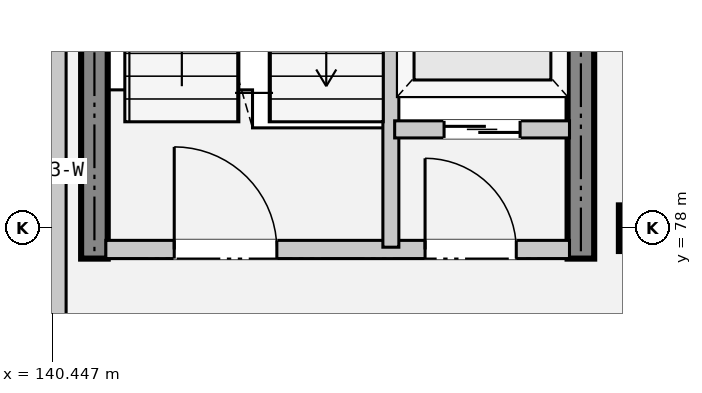
"""IFC4 building model, lengths in metres.
Left out: names, types, materials, properties, quantities, classifications, styles, units other than length and angle.
Written with IfcOpenShell. Run it as: python <this file> out.ifc"""

import sys

from ifc_helpers import new_model, si_unit, direction, frame, frame_2d, origin, origin_2d, place, context, subcontext, project, spatial, rectangle, extrude, element, fill, save


model = new_model("IFC4")
c1 = context("Model", 3, precision=1e-05, world=origin(), true_north=direction((0.0, 1.0)))
c2 = subcontext(c1, "Body", "Model", "MODEL_VIEW")
j1 = project(units=[si_unit("LENGTHUNIT", "METRE"), si_unit("PLANEANGLEUNIT", "RADIAN")], contexts=[c1])
p1 = place(None, origin())
s1 = spatial("IfcSite", under=j1, at=p1, CompositionType="ELEMENT")
p2 = place(p1, origin())
s2 = spatial("IfcBuilding", under=s1, at=p2, CompositionType="ELEMENT")
p3 = place(p2, frame((0.0, 0.0, 15.0)))
s3 = spatial("IfcBuildingStorey", under=s2, at=p3, CompositionType="ELEMENT", Elevation=15.0)
p4 = place(p3, frame((148.2, 78.0, 0.0), z_axis=(0.0, 0.0, 1.0), x_axis=(1.0, 0.0, 0.0)))
e1 = element("IfcColumn", 1, at=p4, inside=s3, PredefinedType="COLUMN", context=c2, shape_type="SweptSolid", body=[
    extrude(rectangle(XDim=0.6, YDim=0.6, at=origin_2d()), origin(), (0.0, 0.0, 1.0), 4.8),
])
for number, where, z_axis, x_axis in (
    (2, (141.0, 77.6, 0.0), (0.0, 0.0, 1.0), (0.0, 1.0, 0.0)),
    (3, (147.4, 77.6, 0.0), (0.0, 0.0, 1.0), (0.0, 1.0, 0.0)),
):
    element("IfcWall", number, at=place(p3, frame(where, z_axis=z_axis, x_axis=x_axis)), inside=s3, PredefinedType="SHEAR", context=c2, shape_type="SweptSolid", body=[
        extrude(rectangle(XDim=8.6, YDim=0.35, at=frame_2d((4.3, 0.0))), origin(), (0.0, 0.0, 1.0), 4.8),
    ])
p5 = place(p3, frame((140.48, 32.0, 0.0), z_axis=(0.0, 0.0, 1.0), x_axis=(0.0, 1.0, 0.0)))
e4 = element("IfcWall", 4, at=p5, inside=s3, PredefinedType="SOLIDWALL", context=c2, shape_type="SweptSolid", body=[
    extrude(rectangle(XDim=69.1, YDim=0.295, at=frame_2d((34.55, 0.0))), origin(), (0.0, 0.0, 1.0), 3.87),
])
p6 = place(p5, frame((5.0, 0.0, 0.78)))
e5 = element("IfcOpeningElement", 5, at=p6, cuts=e4, PredefinedType="OPENING", context=c2, shape_type="SweptSolid", body=[
    extrude(rectangle(XDim=1.8, YDim=2.1, at=frame_2d((0.9, 1.05))), frame((0.0, 0.157, 0.0), z_axis=(0.0, -1.0, 0.0), x_axis=(1.0, 0.0, 0.0)), (0.0, 0.0, 1.0), 0.315),
])
p7 = place(p5, frame((16.7, 0.0, 0.78)))
e6 = element("IfcOpeningElement", 6, at=p7, cuts=e4, PredefinedType="OPENING", context=c2, shape_type="SweptSolid", body=[
    extrude(rectangle(XDim=1.8, YDim=2.1, at=frame_2d((0.9, 1.05))), frame((0.0, 0.157, 0.0), z_axis=(0.0, -1.0, 0.0), x_axis=(1.0, 0.0, 0.0)), (0.0, 0.0, 1.0), 0.315),
])
p8 = place(p5, frame((24.5, 0.0, 0.78)))
e7 = element("IfcOpeningElement", 7, at=p8, cuts=e4, PredefinedType="OPENING", context=c2, shape_type="SweptSolid", body=[
    extrude(rectangle(XDim=1.8, YDim=2.1, at=frame_2d((0.9, 1.05))), frame((0.0, 0.157, 0.0), z_axis=(0.0, -1.0, 0.0), x_axis=(1.0, 0.0, 0.0)), (0.0, 0.0, 1.0), 0.315),
])
p9 = place(p5, frame((32.3, 0.0, 0.78)))
e8 = element("IfcOpeningElement", 8, at=p9, cuts=e4, PredefinedType="OPENING", context=c2, shape_type="SweptSolid", body=[
    extrude(rectangle(XDim=1.8, YDim=2.1, at=frame_2d((0.9, 1.05))), frame((0.0, 0.157, 0.0), z_axis=(0.0, -1.0, 0.0), x_axis=(1.0, 0.0, 0.0)), (0.0, 0.0, 1.0), 0.315),
])
p10 = place(p5, frame((40.1, 0.0, 0.78)))
e9 = element("IfcOpeningElement", 9, at=p10, cuts=e4, PredefinedType="OPENING", context=c2, shape_type="SweptSolid", body=[
    extrude(rectangle(XDim=1.8, YDim=2.1, at=frame_2d((0.9, 1.05))), frame((0.0, 0.157, 0.0), z_axis=(0.0, -1.0, 0.0), x_axis=(1.0, 0.0, 0.0)), (0.0, 0.0, 1.0), 0.315),
])
p11 = place(p5, frame((55.7, 0.0, 0.78)))
e10 = element("IfcOpeningElement", 10, at=p11, cuts=e4, PredefinedType="OPENING", context=c2, shape_type="SweptSolid", body=[
    extrude(rectangle(XDim=1.8, YDim=2.1, at=frame_2d((0.9, 1.05))), frame((0.0, 0.157, 0.0), z_axis=(0.0, -1.0, 0.0), x_axis=(1.0, 0.0, 0.0)), (0.0, 0.0, 1.0), 0.315),
])
p12 = place(p5, frame((59.6, 0.0, 0.78)))
e11 = element("IfcOpeningElement", 11, at=p12, cuts=e4, PredefinedType="OPENING", context=c2, shape_type="SweptSolid", body=[
    extrude(rectangle(XDim=1.8, YDim=2.1, at=frame_2d((0.9, 1.05))), frame((0.0, 0.157, 0.0), z_axis=(0.0, -1.0, 0.0), x_axis=(1.0, 0.0, 0.0)), (0.0, 0.0, 1.0), 0.315),
])
p13 = place(p5, frame((63.5, 0.0, 0.78)))
e12 = element("IfcOpeningElement", 12, at=p13, cuts=e4, PredefinedType="OPENING", context=c2, shape_type="SweptSolid", body=[
    extrude(rectangle(XDim=1.8, YDim=2.1, at=frame_2d((0.9, 1.05))), frame((0.0, 0.157, 0.0), z_axis=(0.0, -1.0, 0.0), x_axis=(1.0, 0.0, 0.0)), (0.0, 0.0, 1.0), 0.315),
])
p14 = place(p3, frame((141.15, 77.72, 0.0), z_axis=(0.0, 0.0, 1.0), x_axis=(1.0, 0.0, 0.0)))
e13 = element("IfcWall", 13, at=p14, inside=s3, PredefinedType="PARTITIONING", context=c2, shape_type="SweptSolid", body=[
    extrude(rectangle(XDim=6.1, YDim=0.24, at=frame_2d((3.05, 0.0))), origin(), (0.0, 0.0, 1.0), 3.87),
])
p15 = place(p14, frame((0.9, 0.0, 0.0)))
e14 = element("IfcOpeningElement", 14, at=p15, cuts=e13, PredefinedType="OPENING", context=c2, shape_type="SweptSolid", body=[
    extrude(rectangle(XDim=1.35, YDim=2.2, at=frame_2d((0.675, 1.1))), frame((0.0, 0.13, 0.0), z_axis=(0.0, -1.0, 0.0), x_axis=(1.0, 0.0, 0.0)), (0.0, 0.0, 1.0), 0.26),
])
p16 = place(p14, frame((4.2, 0.0, 0.0)))
e15 = element("IfcOpeningElement", 15, at=p16, cuts=e13, PredefinedType="OPENING", context=c2, shape_type="SweptSolid", body=[
    extrude(rectangle(XDim=1.2, YDim=2.2, at=frame_2d((0.6, 1.1))), frame((0.0, 0.13, 0.0), z_axis=(0.0, -1.0, 0.0), x_axis=(1.0, 0.0, 0.0)), (0.0, 0.0, 1.0), 0.26),
])
p17 = place(p3, frame((144.9, 77.75, 0.0), z_axis=(0.0, 0.0, 1.0), x_axis=(0.0, 1.0, 0.0)))
e16 = element("IfcWall", 16, at=p17, inside=s3, PredefinedType="PARTITIONING", context=c2, shape_type="SweptSolid", body=[
    extrude(rectangle(XDim=8.3, YDim=0.21, at=frame_2d((4.15, 0.0))), origin(), (0.0, 0.0, 1.0), 3.87),
])
p18 = place(p3, frame((144.95, 79.3, 0.0), z_axis=(0.0, 0.0, 1.0), x_axis=(1.0, 0.0, 0.0)))
e17 = element("IfcWall", 17, at=p18, inside=s3, PredefinedType="PARTITIONING", context=c2, shape_type="SweptSolid", body=[
    extrude(rectangle(XDim=2.3, YDim=0.225, at=frame_2d((1.15, 0.0))), origin(), (0.0, 0.0, 1.0), 3.87),
])
p19 = place(p18, frame((0.65, 0.0, 0.0)))
e18 = element("IfcOpeningElement", 18, at=p19, cuts=e17, PredefinedType="OPENING", context=c2, shape_type="SweptSolid", body=[
    extrude(rectangle(XDim=1.0, YDim=2.15, at=frame_2d((0.5, 1.075))), frame((0.0, 0.123, 0.0), z_axis=(0.0, -1.0, 0.0), x_axis=(1.0, 0.0, 0.0)), (0.0, 0.0, 1.0), 0.245),
])
p20 = place(p15, origin())
e19 = element("IfcDoor", 19, at=p20, inside=s3, OperationType="SINGLE_SWING_LEFT", PredefinedType="DOOR", context=c2, shape_type="SweptSolid", body=[
    extrude(rectangle(XDim=1.35, YDim=2.2, at=frame_2d((0.675, 1.1))), frame((0.0, 0.025, 0.0), z_axis=(0.0, -1.0, 0.0), x_axis=(1.0, 0.0, 0.0)), (0.0, 0.0, 1.0), 0.05),
])
fill(e14, e19)
p21 = place(p16, origin())
e20 = element("IfcDoor", 20, at=p21, inside=s3, OperationType="SINGLE_SWING_RIGHT", PredefinedType="DOOR", context=c2, shape_type="SweptSolid", body=[
    extrude(rectangle(XDim=1.2, YDim=2.2, at=frame_2d((0.6, 1.1))), frame((0.0, 0.025, 0.0), z_axis=(0.0, -1.0, 0.0), x_axis=(1.0, 0.0, 0.0)), (0.0, 0.0, 1.0), 0.05),
])
fill(e15, e20)
p22 = place(p19, origin())
e21 = element("IfcDoor", 21, at=p22, inside=s3, OperationType="SLIDING_TO_LEFT", PredefinedType="DOOR", context=c2, shape_type="SweptSolid", body=[
    extrude(rectangle(XDim=1.0, YDim=2.15, at=frame_2d((0.5, 1.075))), frame((0.0, 0.025, 0.0), z_axis=(0.0, -1.0, 0.0), x_axis=(1.0, 0.0, 0.0)), (0.0, 0.0, 1.0), 0.05),
])
fill(e18, e21)
save(model, sys.argv[1])
